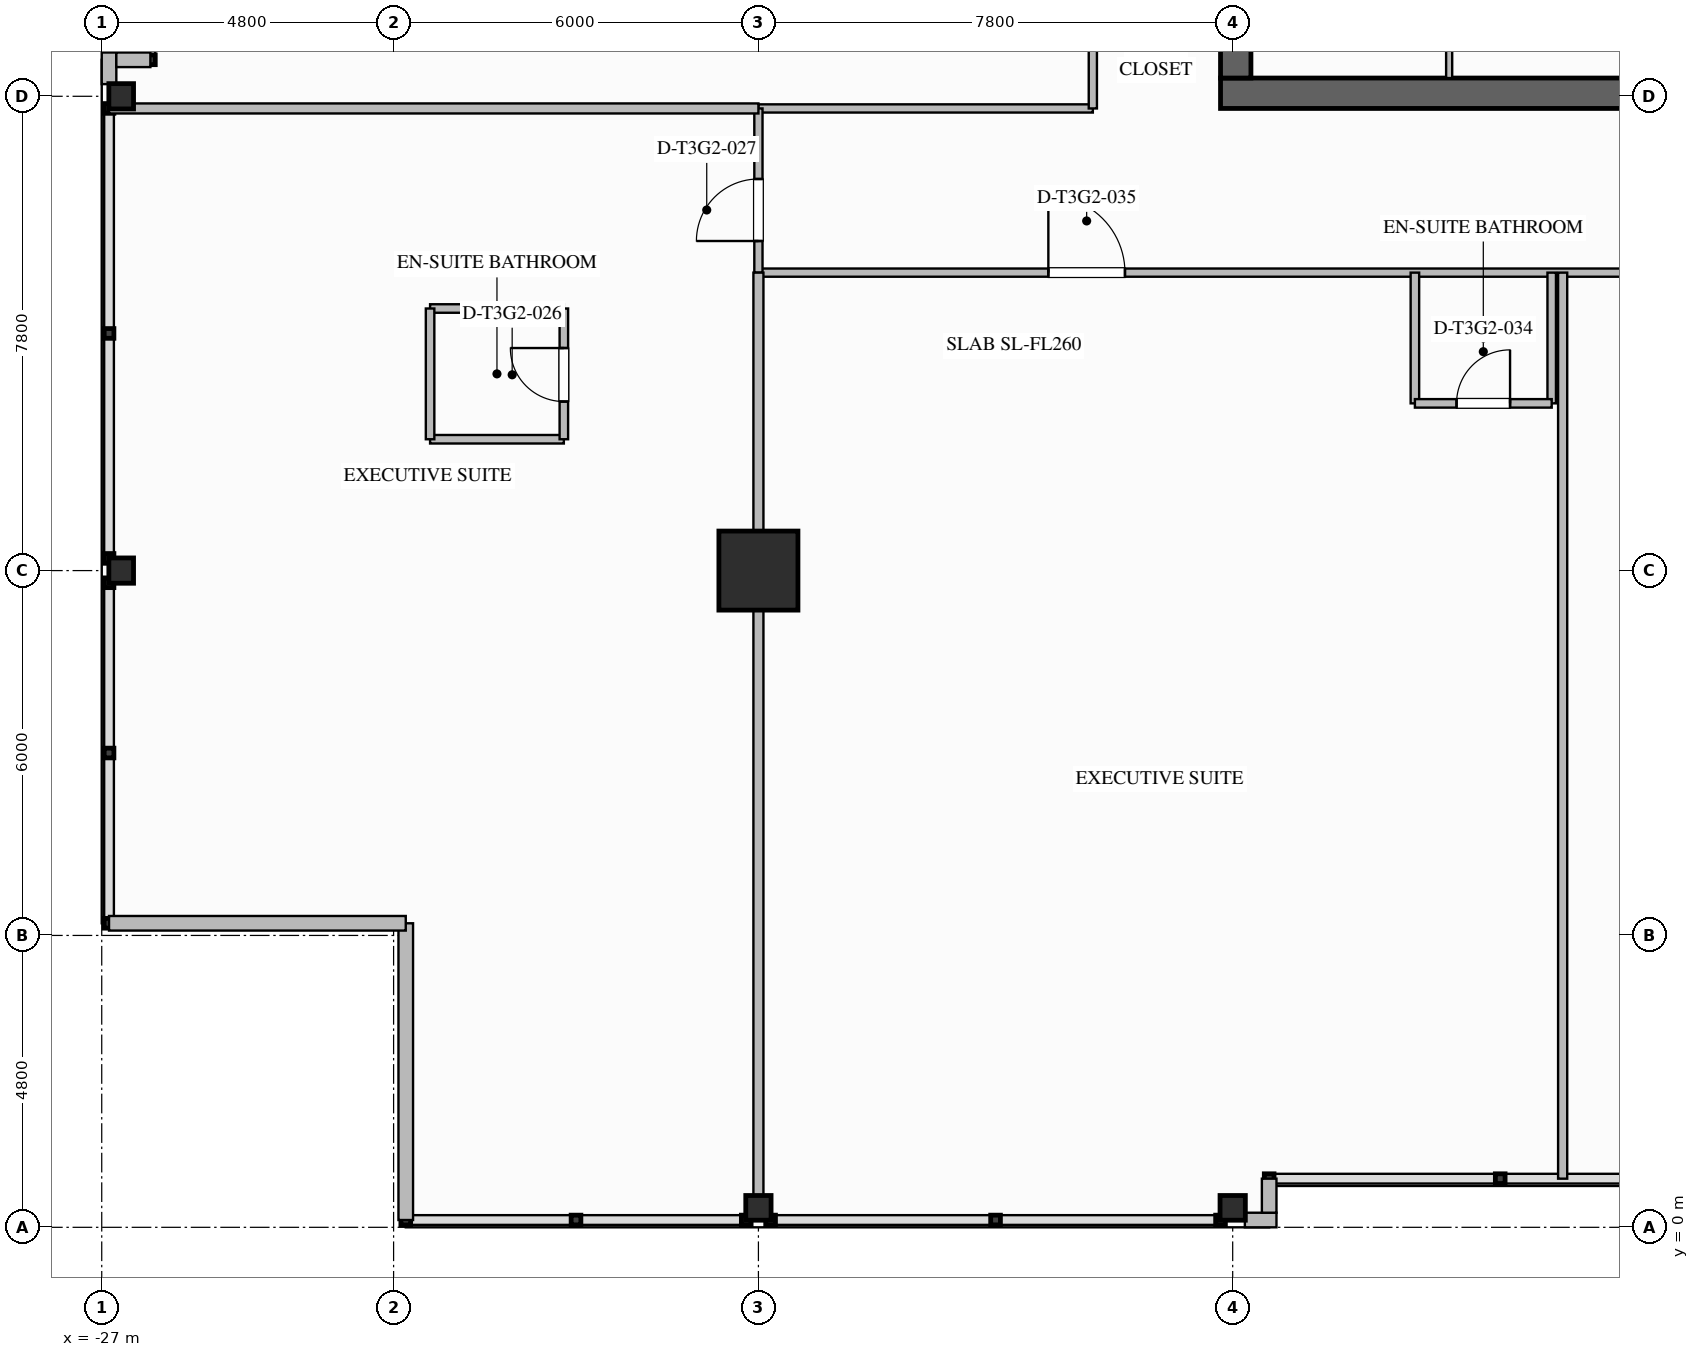
"""IFC4 building model, lengths in metres.
Left out: names, types, materials, properties, quantities, classifications, styles, units other than length and angle.
Written with IfcOpenShell. Run it as: python <this file> out.ifc"""

import sys

from ifc_helpers import new_model, si_unit, direction, frame, frame_2d, origin, origin_2d, place, context, subcontext, project, spatial, rectangle, i_section, extrude, element, fill, save


model = new_model("IFC4")
c1 = context("Model", 3, precision=1e-05, world=origin(), true_north=direction((0.0, 1.0)))
c2 = subcontext(c1, "Body", "Model", "MODEL_VIEW")
j1 = project(units=[si_unit("LENGTHUNIT", "METRE"), si_unit("PLANEANGLEUNIT", "RADIAN")], contexts=[c1])
p1 = place(None, origin())
s1 = spatial("IfcSite", under=j1, at=p1, CompositionType="ELEMENT")
p2 = place(p1, origin())
s2 = spatial("IfcBuilding", under=s1, at=p2, CompositionType="ELEMENT")
p3 = place(p2, frame((0.0, 0.0, 161.05)))
s3 = spatial("IfcBuildingStorey", under=s2, at=p3, CompositionType="ELEMENT", Elevation=161.05)
p4 = place(p3, frame((8.6, 18.65, 0.0), z_axis=(0.0, 0.0, 1.0), x_axis=(-1.0, 0.0, 0.0)))
e1 = element("IfcWall", 1, at=p4, inside=s3, PredefinedType="SHEAR", context=c2, shape_type="SweptSolid", body=[
    extrude(rectangle(XDim=17.2, YDim=0.5, at=frame_2d((8.6, 0.0))), origin(), (0.0, 0.0, 1.0), 3.55),
])
p5 = place(p3, frame((-8.35, 18.9, 0.0), z_axis=(0.0, 0.0, 1.0), x_axis=(0.0, 1.0, 0.0)))
e2 = element("IfcWall", 2, at=p5, inside=s3, PredefinedType="SHEAR", context=c2, shape_type="SweptSolid", body=[
    extrude(rectangle(XDim=16.2, YDim=0.5, at=frame_2d((8.1, 0.0))), origin(), (0.0, 0.0, 1.0), 3.55),
])
p6 = place(p5, frame((12.02, 0.0, 0.0)))
e3 = element("IfcOpeningElement", 3, at=p6, cuts=e2, PredefinedType="OPENING", context=c2, shape_type="SweptSolid", body=[
    extrude(rectangle(XDim=1.08, YDim=2.04, at=frame_2d((0.54, 1.02))), frame((0.0, 0.26, 0.0), z_axis=(0.0, -1.0, 0.0), x_axis=(1.0, 0.0, 0.0)), (0.0, 0.0, 1.0), 0.52),
])
p7 = place(p5, frame((4.5, 0.0, 0.0)))
e4 = element("IfcOpeningElement", 4, at=p7, cuts=e2, PredefinedType="OPENING", context=c2, shape_type="SweptSolid", body=[
    extrude(rectangle(XDim=1.08, YDim=2.04, at=frame_2d((0.54, 1.02))), frame((0.0, 0.26, 0.0), z_axis=(0.0, -1.0, 0.0), x_axis=(1.0, 0.0, 0.0)), (0.0, 0.0, 1.0), 0.52),
])
p8 = place(p3, frame((-16.2, 10.8, 0.0), z_axis=(0.0, 0.0, 1.0), x_axis=(1.0, 0.0, 0.0)))
e5 = element("IfcColumn", 5, at=p8, inside=s3, PredefinedType="COLUMN", context=c2, shape_type="SweptSolid", body=[
    extrude(rectangle(XDim=1.3, YDim=1.3, at=origin_2d()), origin(), (0.0, 0.0, 1.0), 3.55),
])
for number, where, z_axis, x_axis in (
    (6, (-26.68, 10.8, 0.0), (0.0, 0.0, 1.0), (1.0, 0.0, 0.0)),
    (7, (-26.68, 18.6, 0.0), (0.0, 0.0, 1.0), (1.0, 0.0, 0.0)),
    (8, (-16.2, 0.32, 0.0), (0.0, 0.0, 1.0), (0.0, 1.0, 0.0)),
    (9, (-8.4, 0.32, 0.0), (0.0, 0.0, 1.0), (0.0, 1.0, 0.0)),
):
    element("IfcColumn", number, at=place(p3, frame(where, z_axis=z_axis, x_axis=x_axis)), inside=s3, PredefinedType="COLUMN", context=c2, shape_type="SweptSolid", body=[
        extrude(i_section(OverallWidth=0.406, OverallDepth=0.416, WebThickness=0.03, FlangeThickness=0.048, FilletRadius=0.028, at=origin_2d()), origin(), (0.0, 0.0, 1.0), 3.547),
    ])
for number, where, z_axis, x_axis in (
    (10, (-26.88, 18.8, 0.0), (0.0, 0.0, 1.0), (0.0, 1.0, 0.0)),
    (11, (-7.68, 0.12, 0.0), (0.0, 0.0, 1.0), (-1.0, 0.0, 0.0)),
):
    element("IfcWall", number, at=place(p3, frame(where, z_axis=z_axis, x_axis=x_axis)), inside=s3, PredefinedType="STANDARD", context=c2, shape_type="SweptSolid", body=[
        extrude(rectangle(XDim=0.52, YDim=0.24, at=frame_2d((0.26, 0.0))), origin(), (0.0, 0.0, 1.0), 3.29),
    ])
for number, where, z_axis, x_axis in (
    (12, (-22.0, 0.12, 0.0), (0.0, 0.0, 1.0), (0.0, 1.0, 0.0)),
    (13, (-22.0, 5.0, 0.0), (0.0, 0.0, 1.0), (-1.0, 0.0, 0.0)),
):
    element("IfcWall", number, at=place(p3, frame(where, z_axis=z_axis, x_axis=x_axis)), inside=s3, PredefinedType="STANDARD", context=c2, shape_type="SweptSolid", body=[
        extrude(rectangle(XDim=4.88, YDim=0.24, at=frame_2d((2.44, 0.0))), origin(), (0.0, 0.0, 1.0), 3.29),
    ])
for number, where, z_axis, x_axis in (
    (14, (-26.76, 19.2, 0.0), (0.0, 0.0, 1.0), (1.0, 0.0, 0.0)),
    (15, (-7.8, 0.8, 0.0), (0.0, 0.0, 1.0), (0.0, -1.0, 0.0)),
):
    element("IfcWall", number, at=place(p3, frame(where, z_axis=z_axis, x_axis=x_axis)), inside=s3, PredefinedType="STANDARD", context=c2, shape_type="SweptSolid", body=[
        extrude(rectangle(XDim=0.56, YDim=0.24, at=frame_2d((0.28, 0.0))), origin(), (0.0, 0.0, 1.0), 3.29),
    ])
p9 = place(p3, frame((-4.84, 18.9, 0.0), z_axis=(0.0, 0.0, 1.0), x_axis=(0.0, 1.0, 0.0)))
e16 = element("IfcWall", 16, at=p9, inside=s3, PredefinedType="PARTITIONING", context=c2, shape_type="SweptSolid", body=[
    extrude(rectangle(XDim=4.3, YDim=0.1, at=frame_2d((2.15, 0.0))), origin(), (0.0, 0.0, 1.0), 3.29),
])
p10 = place(p3, frame((-16.2, 18.4, 0.0), z_axis=(0.0, 0.0, 1.0), x_axis=(1.0, 0.0, 0.0)))
e17 = element("IfcWall", 17, at=p10, inside=s3, PredefinedType="PARTITIONING", context=c2, shape_type="SweptSolid", body=[
    extrude(rectangle(XDim=5.5, YDim=0.135, at=frame_2d((2.75, 0.0))), origin(), (0.0, 0.0, 1.0), 2.667),
])
p11 = place(p3, frame((-16.2, 15.7, 0.0), z_axis=(0.0, 0.0, 1.0), x_axis=(1.0, 0.0, 0.0)))
e18 = element("IfcWall", 18, at=p11, inside=s3, PredefinedType="PARTITIONING", context=c2, shape_type="SweptSolid", body=[
    extrude(rectangle(XDim=24.8, YDim=0.135, at=frame_2d((12.4, 0.0))), origin(), (0.0, 0.0, 1.0), 3.29),
])
p12 = place(p11, frame((4.768, 0.0, 0.0)))
e19 = element("IfcOpeningElement", 19, at=p12, cuts=e18, PredefinedType="OPENING", context=c2, shape_type="SweptSolid", body=[
    extrude(rectangle(XDim=1.26, YDim=2.2, at=frame_2d((0.63, 1.1))), frame((0.0, 0.077, 0.0), z_axis=(0.0, -1.0, 0.0), x_axis=(1.0, 0.0, 0.0)), (0.0, 0.0, 1.0), 0.155),
])
p13 = place(p11, frame((18.503, 0.0, 0.0)))
e20 = element("IfcOpeningElement", 20, at=p13, cuts=e18, PredefinedType="OPENING", context=c2, shape_type="SweptSolid", body=[
    extrude(rectangle(XDim=1.02, YDim=2.15, at=frame_2d((0.51, 1.075))), frame((0.0, 0.077, 0.0), z_axis=(0.0, -1.0, 0.0), x_axis=(1.0, 0.0, 0.0)), (0.0, 0.0, 1.0), 0.155),
])
p14 = place(p3, frame((-10.7, 18.4, 0.0), z_axis=(0.0, 0.0, 1.0), x_axis=(0.0, 1.0, 0.0)))
e21 = element("IfcWall", 21, at=p14, inside=s3, PredefinedType="PARTITIONING", context=c2, shape_type="SweptSolid", body=[
    extrude(rectangle(XDim=17.2, YDim=0.135, at=frame_2d((8.6, 0.0))), origin(), (0.0, 0.0, 1.0), 3.29),
])
p15 = place(p14, frame((4.255, 0.0, 0.0)))
e22 = element("IfcOpeningElement", 22, at=p15, cuts=e21, PredefinedType="OPENING", context=c2, shape_type="SweptSolid", body=[
    extrude(rectangle(XDim=1.26, YDim=2.2, at=frame_2d((0.63, 1.1))), frame((0.0, 0.077, 0.0), z_axis=(0.0, -1.0, 0.0), x_axis=(1.0, 0.0, 0.0)), (0.0, 0.0, 1.0), 0.155),
])
p16 = place(p14, frame((10.59, 0.0, 0.0)))
e23 = element("IfcOpeningElement", 23, at=p16, cuts=e21, PredefinedType="OPENING", context=c2, shape_type="SweptSolid", body=[
    extrude(rectangle(XDim=1.02, YDim=2.15, at=frame_2d((0.51, 1.075))), frame((0.0, 0.077, 0.0), z_axis=(0.0, -1.0, 0.0), x_axis=(1.0, 0.0, 0.0)), (0.0, 0.0, 1.0), 0.155),
])
p17 = place(p3, frame((-16.2, 15.7, 0.0), z_axis=(0.0, 0.0, 1.0), x_axis=(0.0, 1.0, 0.0)))
e24 = element("IfcWall", 24, at=p17, inside=s3, PredefinedType="PARTITIONING", context=c2, shape_type="SweptSolid", body=[
    extrude(rectangle(XDim=2.7, YDim=0.135, at=frame_2d((1.35, 0.0))), origin(), (0.0, 0.0, 1.0), 2.58),
])
p18 = place(p17, frame((0.52, 0.0, 0.0)))
e25 = element("IfcOpeningElement", 25, at=p18, cuts=e24, PredefinedType="OPENING", context=c2, shape_type="SweptSolid", body=[
    extrude(rectangle(XDim=1.02, YDim=2.15, at=frame_2d((0.51, 1.075))), frame((0.0, 0.077, 0.0), z_axis=(0.0, -1.0, 0.0), x_axis=(1.0, 0.0, 0.0)), (0.0, 0.0, 1.0), 0.155),
])
p19 = place(p3, frame((-16.2, 0.12, 0.0), z_axis=(0.0, 0.0, 1.0), x_axis=(0.0, 1.0, 0.0)))
e26 = element("IfcWall", 26, at=p19, inside=s3, PredefinedType="PARTITIONING", context=c2, shape_type="SweptSolid", body=[
    extrude(rectangle(XDim=15.58, YDim=0.165, at=frame_2d((7.79, 0.0))), origin(), (0.0, 0.0, 1.0), 2.58),
])
p20 = place(p3, frame((-26.88, 18.4, 0.0), z_axis=(0.0, 0.0, 1.0), x_axis=(1.0, 0.0, 0.0)))
e27 = element("IfcWall", 27, at=p20, inside=s3, PredefinedType="PARTITIONING", context=c2, shape_type="SweptSolid", body=[
    extrude(rectangle(XDim=10.68, YDim=0.165, at=frame_2d((5.34, 0.0))), origin(), (0.0, 0.0, 1.0), 2.58),
])
for number, where, z_axis, x_axis in (
    (28, (-21.6, 12.96, 0.0), (0.0, 0.0, 1.0), (1.0, 0.0, 0.0)),
    (29, (-21.6, 15.11, 0.0), (0.0, 0.0, 1.0), (1.0, 0.0, 0.0)),
):
    element("IfcWall", number, at=place(p3, frame(where, z_axis=z_axis, x_axis=x_axis)), inside=s3, PredefinedType="PLUMBINGWALL", context=c2, shape_type="SweptSolid", body=[
        extrude(rectangle(XDim=2.2, YDim=0.14, at=frame_2d((1.1, 0.0))), origin(), (0.0, 0.0, 1.0), 3.29),
    ])
p21 = place(p3, frame((-21.6, 12.96, 0.0), z_axis=(0.0, 0.0, 1.0), x_axis=(0.0, 1.0, 0.0)))
e30 = element("IfcWall", 30, at=p21, inside=s3, PredefinedType="PLUMBINGWALL", context=c2, shape_type="SweptSolid", body=[
    extrude(rectangle(XDim=2.15, YDim=0.14, at=frame_2d((1.075, 0.0))), origin(), (0.0, 0.0, 1.0), 3.29),
])
p22 = place(p3, frame((-19.4, 12.96, 0.0), z_axis=(0.0, 0.0, 1.0), x_axis=(0.0, 1.0, 0.0)))
e31 = element("IfcWall", 31, at=p22, inside=s3, PredefinedType="PLUMBINGWALL", context=c2, shape_type="SweptSolid", body=[
    extrude(rectangle(XDim=2.15, YDim=0.14, at=frame_2d((1.075, 0.0))), origin(), (0.0, 0.0, 1.0), 3.29),
])
p23 = place(p22, frame((0.62, 0.0, 0.0)))
e32 = element("IfcOpeningElement", 32, at=p23, cuts=e31, PredefinedType="OPENING", context=c2, shape_type="SweptSolid", body=[
    extrude(rectangle(XDim=0.88, YDim=2.1, at=frame_2d((0.44, 1.05))), frame((0.0, 0.08, 0.0), z_axis=(0.0, -1.0, 0.0), x_axis=(1.0, 0.0, 0.0)), (0.0, 0.0, 1.0), 0.16),
])
for number, where, z_axis, x_axis in (
    (33, (-5.403, 15.7, 0.0), (0.0, 0.0, 1.0), (0.0, -1.0, 0.0)),
    (34, (-3.153, 15.7, 0.0), (0.0, 0.0, 1.0), (0.0, -1.0, 0.0)),
):
    element("IfcWall", number, at=place(p3, frame(where, z_axis=z_axis, x_axis=x_axis)), inside=s3, PredefinedType="PLUMBINGWALL", context=c2, shape_type="SweptSolid", body=[
        extrude(rectangle(XDim=2.15, YDim=0.14, at=frame_2d((1.075, 0.0))), origin(), (0.0, 0.0, 1.0), 3.29),
    ])
p24 = place(p3, frame((-5.403, 13.55, 0.0), z_axis=(0.0, 0.0, 1.0), x_axis=(1.0, 0.0, 0.0)))
e35 = element("IfcWall", 35, at=p24, inside=s3, PredefinedType="PLUMBINGWALL", context=c2, shape_type="SweptSolid", body=[
    extrude(rectangle(XDim=2.25, YDim=0.14, at=frame_2d((1.125, 0.0))), origin(), (0.0, 0.0, 1.0), 3.29),
])
p25 = place(p24, frame((0.685, 0.0, 0.0)))
e36 = element("IfcOpeningElement", 36, at=p25, cuts=e35, PredefinedType="OPENING", context=c2, shape_type="SweptSolid", body=[
    extrude(rectangle(XDim=0.88, YDim=2.1, at=frame_2d((0.44, 1.05))), frame((0.0, 0.08, 0.0), z_axis=(0.0, -1.0, 0.0), x_axis=(1.0, 0.0, 0.0)), (0.0, 0.0, 1.0), 0.16),
])
p26 = place(p3, frame((-2.973, 0.8, 0.0), z_axis=(0.0, 0.0, 1.0), x_axis=(0.0, 1.0, 0.0)))
e37 = element("IfcWall", 37, at=p26, inside=s3, PredefinedType="PARTITIONING", context=c2, shape_type="SweptSolid", body=[
    extrude(rectangle(XDim=14.9, YDim=0.15, at=frame_2d((7.45, 0.0))), origin(), (0.0, 0.0, 1.0), 3.29),
])
p27 = place(p23, origin())
e38 = element("IfcDoor", 38, at=p27, inside=s3, OperationType="SINGLE_SWING_RIGHT", PredefinedType="DOOR", context=c2, shape_type="SweptSolid", body=[
    extrude(rectangle(XDim=0.88, YDim=2.1, at=frame_2d((0.44, 1.05))), frame((0.0, 0.025, 0.0), z_axis=(0.0, -1.0, 0.0), x_axis=(1.0, 0.0, 0.0)), (0.0, 0.0, 1.0), 0.05),
])
fill(e32, e38)
p28 = place(p18, origin())
e39 = element("IfcDoor", 39, at=p28, inside=s3, OperationType="SINGLE_SWING_LEFT", PredefinedType="DOOR", context=c2, shape_type="SweptSolid", body=[
    extrude(rectangle(XDim=1.02, YDim=2.15, at=frame_2d((0.51, 1.075))), frame((0.0, 0.025, 0.0), z_axis=(0.0, -1.0, 0.0), x_axis=(1.0, 0.0, 0.0)), (0.0, 0.0, 1.0), 0.05),
])
fill(e25, e39)
p29 = place(p25, origin())
e40 = element("IfcDoor", 40, at=p29, inside=s3, OperationType="SINGLE_SWING_RIGHT", PredefinedType="DOOR", context=c2, shape_type="SweptSolid", body=[
    extrude(rectangle(XDim=0.88, YDim=2.1, at=frame_2d((0.44, 1.05))), frame((0.0, 0.025, 0.0), z_axis=(0.0, -1.0, 0.0), x_axis=(1.0, 0.0, 0.0)), (0.0, 0.0, 1.0), 0.05),
])
fill(e36, e40)
p30 = place(p12, origin())
e41 = element("IfcDoor", 41, at=p30, inside=s3, OperationType="SINGLE_SWING_LEFT", PredefinedType="DOOR", context=c2, shape_type="SweptSolid", body=[
    extrude(rectangle(XDim=1.26, YDim=2.2, at=frame_2d((0.63, 1.1))), frame((0.0, 0.025, 0.0), z_axis=(0.0, -1.0, 0.0), x_axis=(1.0, 0.0, 0.0)), (0.0, 0.0, 1.0), 0.05),
])
fill(e19, e41)
save(model, sys.argv[1])
